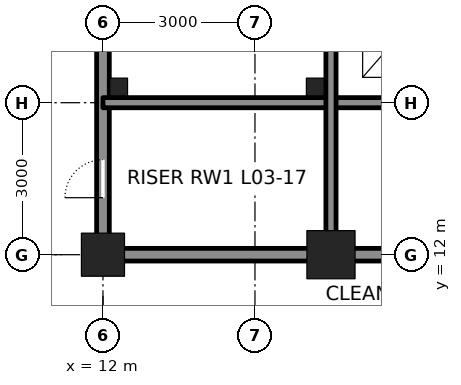
"""IFC4 building model, lengths in metres.
Left out: names, types, materials, properties, quantities, classifications, styles, units other than length and angle.
Written with IfcOpenShell. Run it as: python <this file> out.ifc"""

import sys

from ifc_helpers import new_model, si_unit, direction, frame, frame_2d, origin, origin_2d, place, context, subcontext, project, spatial, rectangle, hollow_rectangle, extrude, element, fill, save


model = new_model("IFC4")
c1 = context("Model", 3, precision=1e-05, world=origin(), true_north=direction((0.0, 1.0)))
c2 = subcontext(c1, "Body", "Model", "MODEL_VIEW")
j1 = project(units=[si_unit("LENGTHUNIT", "METRE"), si_unit("PLANEANGLEUNIT", "RADIAN")], contexts=[c1])
p1 = place(None, origin())
s1 = spatial("IfcSite", under=j1, at=p1, CompositionType="ELEMENT")
p2 = place(p1, origin())
s2 = spatial("IfcBuilding", under=s1, at=p2, CompositionType="ELEMENT")
p3 = place(p2, frame((0.0, 0.0, 19.5)))
s3 = spatial("IfcBuildingStorey", under=s2, at=p3, CompositionType="ELEMENT", Elevation=19.5)
p4 = place(p3, frame((12.0, 12.0, 0.0), z_axis=(0.0, 0.0, 1.0), x_axis=(1.0, 0.0, 0.0)))
e1 = element("IfcColumn", 1, at=p4, inside=s3, PredefinedType="COLUMN", context=c2, shape_type="SweptSolid", body=[
    extrude(hollow_rectangle(XDim=0.85, YDim=0.85, WallThickness=0.085, at=origin_2d()), origin(), (0.0, 0.0, 1.0), 4.8),
])
p5 = place(p3, frame((16.5, 12.0, 0.0), z_axis=(0.0, 0.0, 1.0), x_axis=(1.0, 0.0, 0.0)))
e2 = element("IfcColumn", 2, at=p5, inside=s3, PredefinedType="COLUMN", context=c2, shape_type="SweptSolid", body=[
    extrude(hollow_rectangle(XDim=0.95, YDim=0.95, WallThickness=0.095, at=origin_2d()), origin(), (0.0, 0.0, 1.0), 4.8),
])
p6 = place(p3, frame((12.0, 12.25, 0.0), z_axis=(0.0, 0.0, 1.0), x_axis=(0.0, 1.0, 0.0)))
e3 = element("IfcWall", 3, at=p6, inside=s3, PredefinedType="SOLIDWALL", context=c2, shape_type="SweptSolid", body=[
    extrude(rectangle(XDim=8.5, YDim=0.25, at=frame_2d((4.25, 0.0))), origin(), (0.0, 0.0, 1.0), 3.413),
])
p7 = place(p6, frame((0.875, 0.0, 0.0)))
e4 = element("IfcOpeningElement", 4, at=p7, cuts=e3, PredefinedType="OPENING", context=c2, shape_type="SweptSolid", body=[
    extrude(rectangle(XDim=0.75, YDim=2.1, at=frame_2d((0.375, 1.05))), frame((0.0, 0.135, 0.0), z_axis=(0.0, -1.0, 0.0), x_axis=(1.0, 0.0, 0.0)), (0.0, 0.0, 1.0), 0.27),
])
p8 = place(p3, frame((12.25, 12.0, 0.0), z_axis=(0.0, 0.0, 1.0), x_axis=(1.0, 0.0, 0.0)))
e5 = element("IfcWall", 5, at=p8, inside=s3, PredefinedType="SOLIDWALL", context=c2, shape_type="SweptSolid", body=[
    extrude(rectangle(XDim=4.0, YDim=0.25, at=frame_2d((2.0, 0.0))), origin(), (0.0, 0.0, 1.0), 3.481),
])
p9 = place(p3, frame((16.75, 12.0, 0.0), z_axis=(0.0, 0.0, 1.0), x_axis=(1.0, 0.0, 0.0)))
e6 = element("IfcWall", 6, at=p9, inside=s3, PredefinedType="SOLIDWALL", context=c2, shape_type="SweptSolid", body=[
    extrude(rectangle(XDim=2.5, YDim=0.25, at=frame_2d((1.25, 0.0))), origin(), (0.0, 0.0, 1.0), 3.481),
])
p10 = place(p3, frame((12.0, 15.0, 0.0), z_axis=(0.0, 0.0, 1.0), x_axis=(1.0, 0.0, 0.0)))
e7 = element("IfcWall", 7, at=p10, inside=s3, PredefinedType="SOLIDWALL", context=c2, shape_type="SweptSolid", body=[
    extrude(rectangle(XDim=7.5, YDim=0.2, at=frame_2d((3.75, 0.0))), origin(), (0.0, 0.0, 1.0), 4.64),
])
p11 = place(p3, frame((16.5, 12.25, 0.0), z_axis=(0.0, 0.0, 1.0), x_axis=(0.0, 1.0, 0.0)))
e8 = element("IfcWall", 8, at=p11, inside=s3, PredefinedType="SOLIDWALL", context=c2, shape_type="SweptSolid", body=[
    extrude(rectangle(XDim=8.5, YDim=0.2, at=frame_2d((4.25, 0.0))), origin(), (0.0, 0.0, 1.0), 3.713),
])
for number, where, z_axis, x_axis in (
    (9, (12.31, 15.31, 0.0), (0.0, 0.0, 1.0), (1.0, 0.0, 0.0)),
    (10, (16.19, 15.31, 0.0), (0.0, 0.0, 1.0), (1.0, 0.0, 0.0)),
):
    element("IfcColumn", number, at=place(p3, frame(where, z_axis=z_axis, x_axis=x_axis)), inside=s3, PredefinedType="COLUMN", context=c2, shape_type="SweptSolid", body=[
        extrude(hollow_rectangle(XDim=0.35, YDim=0.35, WallThickness=0.035, at=origin_2d()), origin(), (0.0, 0.0, 1.0), 4.8),
    ])
p12 = place(p7, origin())
e11 = element("IfcDoor", 11, at=p12, inside=s3, OperationType="SINGLE_SWING_LEFT", PredefinedType="DOOR", context=c2, shape_type="SweptSolid", body=[
    extrude(rectangle(XDim=0.75, YDim=2.1, at=frame_2d((0.375, 1.05))), frame((0.0, 0.025, 0.0), z_axis=(0.0, -1.0, 0.0), x_axis=(1.0, 0.0, 0.0)), (0.0, 0.0, 1.0), 0.05),
])
fill(e4, e11)
save(model, sys.argv[1])
